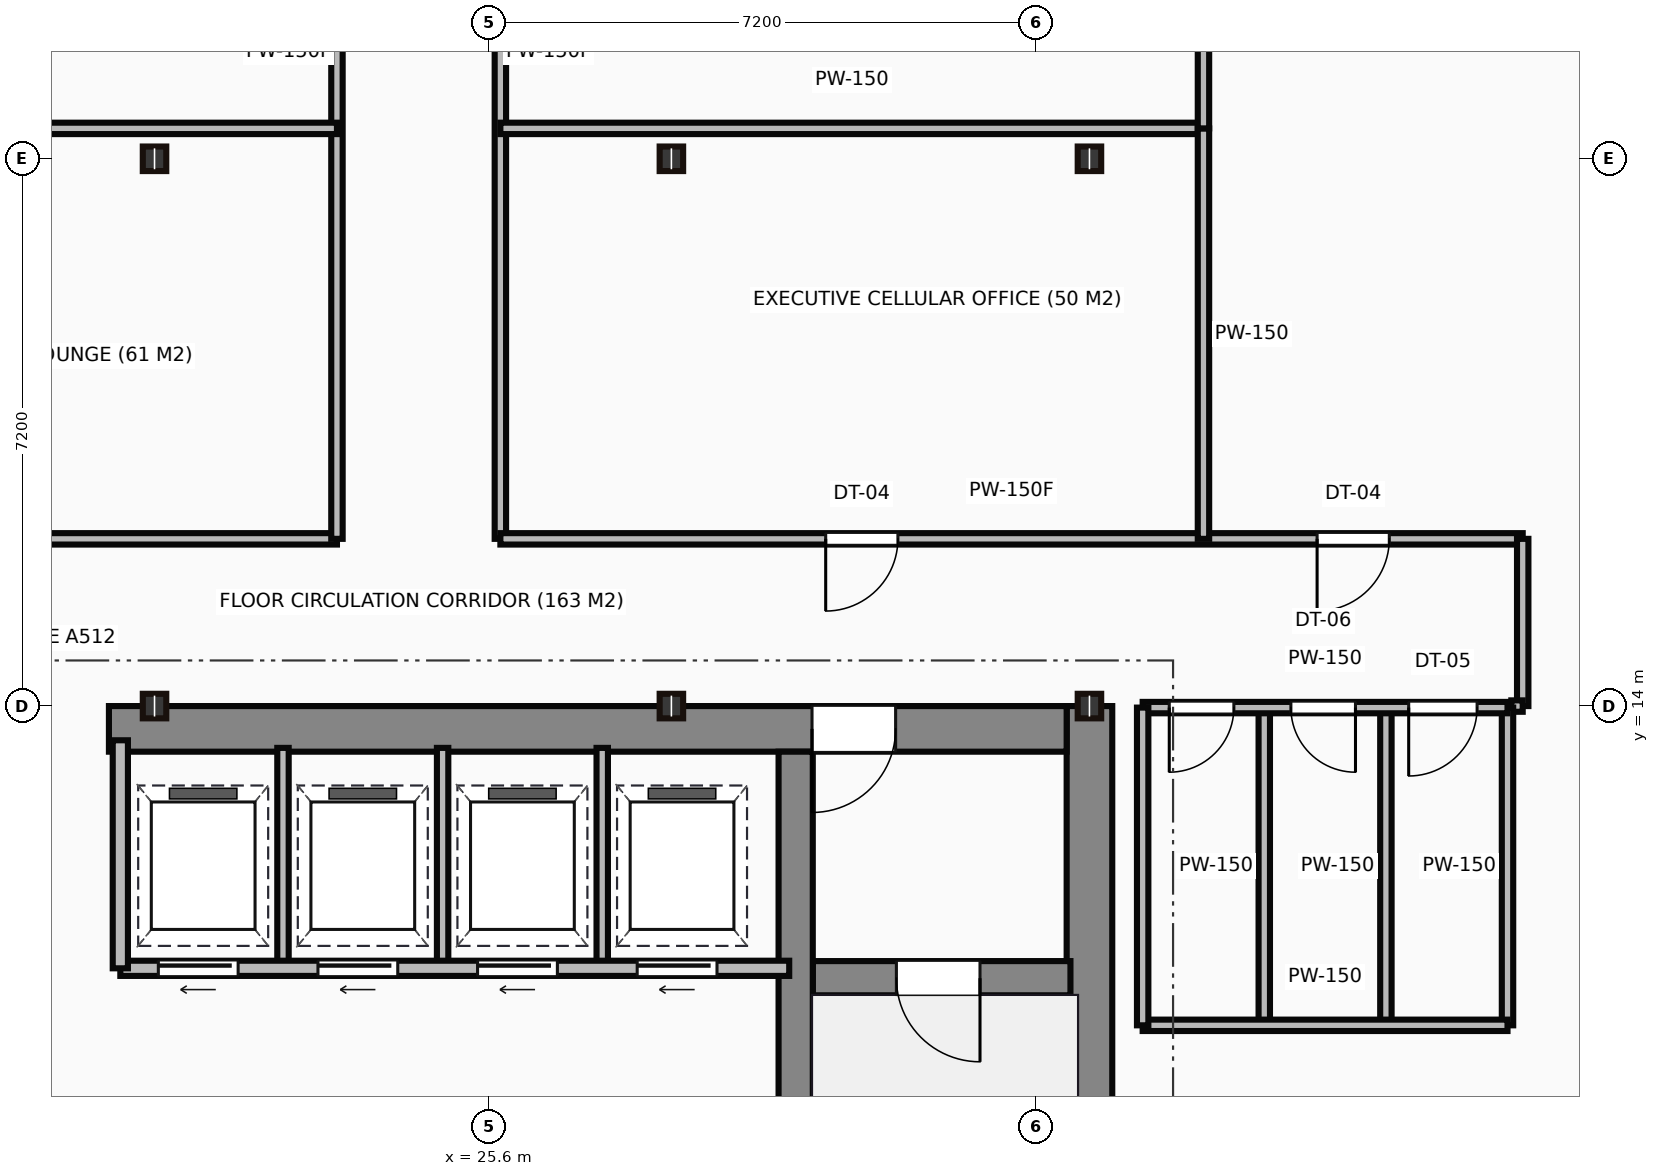
"""IFC4 building model, lengths in metres.
Left out: names, types, materials, properties, quantities, classifications, styles, units other than length and angle.
Written with IfcOpenShell. Run it as: python <this file> out.ifc"""

import sys

from ifc_helpers import new_model, si_unit, direction, frame, frame_2d, origin, origin_2d, place, context, subcontext, project, spatial, rectangle, i_section, extrude, source, transform, mapped, element, fill, save


model = new_model("IFC4")
c1 = context("Model", 3, precision=1e-05, world=origin(), true_north=direction((0.0, 1.0)))
c2 = subcontext(c1, "Body", "Model", "MODEL_VIEW")
j1 = project(units=[si_unit("LENGTHUNIT", "METRE"), si_unit("PLANEANGLEUNIT", "RADIAN")], contexts=[c1])
p1 = place(None, origin())
s1 = spatial("IfcSite", under=j1, at=p1, CompositionType="ELEMENT")
p2 = place(p1, origin())
s2 = spatial("IfcBuilding", under=s1, at=p2, CompositionType="ELEMENT")
p3 = place(p2, frame((0.0, 0.0, 277.05)))
s3 = spatial("IfcBuildingStorey", under=s2, at=p3, CompositionType="ELEMENT", Elevation=277.05)
m1 = source(origin(), c2, "Body", "SweptSolid", [
    extrude(rectangle(XDim=13.1, YDim=0.6, at=frame_2d((6.55, 0.0))), origin(), (0.0, 0.0, 1.0), 3.65),
])
p4 = place(p3, frame((33.5, 0.9, 0.0), z_axis=(0.0, 0.0, 1.0), x_axis=(0.0, 1.0, 0.0)))
e1 = element("IfcWall", 1, at=p4, inside=s3, PredefinedType="SHEAR", context=c2, shape_type="MappedRepresentation", body=[
    mapped(m1, transform((0.0, 0.0, 0.0))),
])
m2 = source(origin(), c2, "Body", "SweptSolid", [
    extrude(rectangle(XDim=12.6, YDim=0.6, at=frame_2d((6.3, 0.0))), origin(), (0.0, 0.0, 1.0), 3.65),
])
p5 = place(p3, frame((20.6, 13.7, 0.0), z_axis=(0.0, 0.0, 1.0), x_axis=(1.0, 0.0, 0.0)))
e2 = element("IfcWall", 2, at=p5, inside=s3, PredefinedType="SHEAR", context=c2, shape_type="MappedRepresentation", body=[
    mapped(m2, transform((0.0, 0.0, 0.0))),
])
p6 = place(p5, frame((9.25, 0.0, 0.0)))
e3 = element("IfcOpeningElement", 3, at=p6, cuts=e2, PredefinedType="OPENING", context=c2, shape_type="SweptSolid", body=[
    extrude(rectangle(XDim=1.1, YDim=2.15, at=frame_2d((0.55, 1.075))), frame((0.0, 0.31, 0.0), z_axis=(0.0, -1.0, 0.0), x_axis=(1.0, 0.0, 0.0)), (0.0, 0.0, 1.0), 0.62),
])
m3 = source(origin(), c2, "Body", "SweptSolid", [
    extrude(rectangle(XDim=12.5, YDim=0.45, at=frame_2d((6.25, 0.0))), origin(), (0.0, 0.0, 1.0), 3.65),
])
p7 = place(p3, frame((29.635, 0.9, 0.0), z_axis=(0.0, 0.0, 1.0), x_axis=(0.0, 1.0, 0.0)))
e4 = element("IfcWall", 4, at=p7, inside=s3, PredefinedType="SHEAR", context=c2, shape_type="MappedRepresentation", body=[
    mapped(m3, transform((0.0, 0.0, 0.0))),
])
m4 = source(origin(), c2, "Body", "SweptSolid", [
    extrude(rectangle(XDim=3.39, YDim=0.45, at=frame_2d((1.695, 0.0))), origin(), (0.0, 0.0, 1.0), 3.65),
])
p8 = place(p3, frame((29.86, 10.42, 0.0), z_axis=(0.0, 0.0, 1.0), x_axis=(1.0, 0.0, 0.0)))
e5 = element("IfcWall", 5, at=p8, inside=s3, PredefinedType="SHEAR", context=c2, shape_type="MappedRepresentation", body=[
    mapped(m4, transform((0.0, 0.0, 0.0))),
])
p9 = place(p8, frame((1.1, 0.0, 0.0)))
e6 = element("IfcOpeningElement", 6, at=p9, cuts=e5, PredefinedType="OPENING", context=c2, shape_type="SweptSolid", body=[
    extrude(rectangle(XDim=1.1, YDim=2.15, at=frame_2d((0.55, 1.075))), frame((0.0, 0.235, 0.0), z_axis=(0.0, -1.0, 0.0), x_axis=(1.0, 0.0, 0.0)), (0.0, 0.0, 1.0), 0.47),
])
m5 = source(origin(), c2, "Body", "SweptSolid", [
    extrude(i_section(OverallWidth=0.309, OverallDepth=0.323, WebThickness=0.014, FlangeThickness=0.023, at=origin_2d()), origin(), (0.0, 0.0, 1.0), 3.65),
])
for number, where, z_axis, x_axis in (
    (7, (21.2, 14.0, 0.0), (0.0, 0.0, 1.0), (1.0, 0.0, 0.0)),
    (8, (21.2, 21.2, 0.0), (0.0, 0.0, 1.0), (1.0, 0.0, 0.0)),
    (9, (28.0, 14.0, 0.0), (0.0, 0.0, 1.0), (1.0, 0.0, 0.0)),
    (10, (28.0, 21.2, 0.0), (0.0, 0.0, 1.0), (1.0, 0.0, 0.0)),
    (11, (33.5, 14.0, 0.0), (0.0, 0.0, 1.0), (1.0, 0.0, 0.0)),
    (12, (33.5, 21.2, 0.0), (0.0, 0.0, 1.0), (1.0, 0.0, 0.0)),
):
    element("IfcColumn", number, at=place(p3, frame(where, z_axis=z_axis, x_axis=x_axis)), inside=s3, PredefinedType="COLUMN", context=c2, shape_type="MappedRepresentation", body=[
        mapped(m5, transform((0.0, 0.0, 0.0))),
    ])
m6 = source(origin(), c2, "Body", "SweptSolid", [
    extrude(rectangle(XDim=8.8, YDim=0.2, at=frame_2d((4.4, 0.0))), origin(), (0.0, 0.0, 1.0), 3.4),
])
p10 = place(p3, frame((20.75, 10.55, 0.0), z_axis=(0.0, 0.0, 1.0), x_axis=(1.0, 0.0, 0.0)))
e13 = element("IfcWall", 13, at=p10, inside=s3, PredefinedType="PARTITIONING", context=c2, shape_type="MappedRepresentation", body=[
    mapped(m6, transform((0.0, 0.0, 0.0))),
])
p11 = place(p10, frame((0.5, 0.0, 0.0)))
e14 = element("IfcOpeningElement", 14, at=p11, cuts=e13, PredefinedType="OPENING", context=c2, shape_type="SweptSolid", body=[
    extrude(rectangle(XDim=1.05, YDim=2.15, at=frame_2d((0.525, 1.075))), frame((0.0, 0.11, 0.0), z_axis=(0.0, -1.0, 0.0), x_axis=(1.0, 0.0, 0.0)), (0.0, 0.0, 1.0), 0.22),
])
p12 = place(p10, frame((2.6, 0.0, 0.0)))
e15 = element("IfcOpeningElement", 15, at=p12, cuts=e13, PredefinedType="OPENING", context=c2, shape_type="SweptSolid", body=[
    extrude(rectangle(XDim=1.05, YDim=2.15, at=frame_2d((0.525, 1.075))), frame((0.0, 0.11, 0.0), z_axis=(0.0, -1.0, 0.0), x_axis=(1.0, 0.0, 0.0)), (0.0, 0.0, 1.0), 0.22),
])
p13 = place(p10, frame((4.7, 0.0, 0.0)))
e16 = element("IfcOpeningElement", 16, at=p13, cuts=e13, PredefinedType="OPENING", context=c2, shape_type="SweptSolid", body=[
    extrude(rectangle(XDim=1.05, YDim=2.15, at=frame_2d((0.525, 1.075))), frame((0.0, 0.11, 0.0), z_axis=(0.0, -1.0, 0.0), x_axis=(1.0, 0.0, 0.0)), (0.0, 0.0, 1.0), 0.22),
])
p14 = place(p10, frame((6.8, 0.0, 0.0)))
e17 = element("IfcOpeningElement", 17, at=p14, cuts=e13, PredefinedType="OPENING", context=c2, shape_type="SweptSolid", body=[
    extrude(rectangle(XDim=1.05, YDim=2.15, at=frame_2d((0.525, 1.075))), frame((0.0, 0.11, 0.0), z_axis=(0.0, -1.0, 0.0), x_axis=(1.0, 0.0, 0.0)), (0.0, 0.0, 1.0), 0.22),
])
m7 = source(origin(), c2, "Body", "SweptSolid", [
    extrude(rectangle(XDim=3.0, YDim=0.2, at=frame_2d((1.5, 0.0))), origin(), (0.0, 0.0, 1.0), 3.4),
])
p15 = place(p3, frame((20.75, 10.55, 0.0), z_axis=(0.0, 0.0, 1.0), x_axis=(0.0, 1.0, 0.0)))
e18 = element("IfcWall", 18, at=p15, inside=s3, PredefinedType="PARTITIONING", context=c2, shape_type="MappedRepresentation", body=[
    mapped(m7, transform((0.0, 0.0, 0.0))),
])
m8 = source(origin(), c2, "Body", "SweptSolid", [
    extrude(rectangle(XDim=2.85, YDim=0.15, at=frame_2d((1.425, 0.0))), origin(), (0.0, 0.0, 1.0), 3.4),
])
for number, where, z_axis, x_axis in (
    (19, (22.89, 10.6, 0.0), (0.0, 0.0, 1.0), (0.0, 1.0, 0.0)),
    (20, (24.99, 10.6, 0.0), (0.0, 0.0, 1.0), (0.0, 1.0, 0.0)),
    (21, (27.09, 10.6, 0.0), (0.0, 0.0, 1.0), (0.0, 1.0, 0.0)),
):
    element("IfcWall", number, at=place(p3, frame(where, z_axis=z_axis, x_axis=x_axis)), inside=s3, PredefinedType="PARTITIONING", context=c2, shape_type="MappedRepresentation", body=[
        mapped(m8, transform((0.0, 0.0, 0.0))),
    ])
m9 = source(origin(), c2, "Body", "SweptSolid", [
    extrude(rectangle(XDim=4.8, YDim=0.15, at=frame_2d((2.4, 0.0))), origin(), (0.0, 0.0, 1.0), 2.787),
])
p16 = place(p3, frame((34.2, 13.98, 0.0), z_axis=(0.0, 0.0, 1.0), x_axis=(1.0, 0.0, 0.0)))
e22 = element("IfcWall", 22, at=p16, inside=s3, PredefinedType="PARTITIONING", context=c2, shape_type="MappedRepresentation", body=[
    mapped(m9, transform((0.0, 0.0, 0.0))),
])
p17 = place(p16, frame((0.35, 0.0, 0.0)))
e23 = element("IfcOpeningElement", 23, at=p17, cuts=e22, PredefinedType="OPENING", context=c2, shape_type="SweptSolid", body=[
    extrude(rectangle(XDim=0.85, YDim=2.1, at=frame_2d((0.425, 1.05))), frame((0.0, 0.085, 0.0), z_axis=(0.0, -1.0, 0.0), x_axis=(1.0, 0.0, 0.0)), (0.0, 0.0, 1.0), 0.17),
])
p18 = place(p16, frame((1.95, 0.0, 0.0)))
e24 = element("IfcOpeningElement", 24, at=p18, cuts=e22, PredefinedType="OPENING", context=c2, shape_type="SweptSolid", body=[
    extrude(rectangle(XDim=0.85, YDim=2.1, at=frame_2d((0.425, 1.05))), frame((0.0, 0.085, 0.0), z_axis=(0.0, -1.0, 0.0), x_axis=(1.0, 0.0, 0.0)), (0.0, 0.0, 1.0), 0.17),
])
p19 = place(p16, frame((3.5, 0.0, 0.0)))
e25 = element("IfcOpeningElement", 25, at=p19, cuts=e22, PredefinedType="OPENING", context=c2, shape_type="SweptSolid", body=[
    extrude(rectangle(XDim=0.9, YDim=2.1, at=frame_2d((0.45, 1.05))), frame((0.0, 0.085, 0.0), z_axis=(0.0, -1.0, 0.0), x_axis=(1.0, 0.0, 0.0)), (0.0, 0.0, 1.0), 0.17),
])
m10 = source(origin(), c2, "Body", "SweptSolid", [
    extrude(rectangle(XDim=4.8, YDim=0.15, at=frame_2d((2.4, 0.0))), origin(), (0.0, 0.0, 1.0), 3.4),
])
p20 = place(p3, frame((34.2, 9.8, 0.0), z_axis=(0.0, 0.0, 1.0), x_axis=(1.0, 0.0, 0.0)))
e26 = element("IfcWall", 26, at=p20, inside=s3, PredefinedType="PARTITIONING", context=c2, shape_type="MappedRepresentation", body=[
    mapped(m10, transform((0.0, 0.0, 0.0))),
])
m11 = source(origin(), c2, "Body", "SweptSolid", [
    extrude(rectangle(XDim=4.18, YDim=0.15, at=frame_2d((2.09, 0.0))), origin(), (0.0, 0.0, 1.0), 3.4),
])
for number, where, z_axis, x_axis in (
    (27, (39.0, 9.8, 0.0), (0.0, 0.0, 1.0), (0.0, 1.0, 0.0)),
    (28, (34.2, 9.8, 0.0), (0.0, 0.0, 1.0), (0.0, 1.0, 0.0)),
    (29, (35.8, 9.8, 0.0), (0.0, 0.0, 1.0), (0.0, 1.0, 0.0)),
    (30, (37.4, 9.8, 0.0), (0.0, 0.0, 1.0), (0.0, 1.0, 0.0)),
):
    element("IfcWall", number, at=place(p3, frame(where, z_axis=z_axis, x_axis=x_axis)), inside=s3, PredefinedType="PARTITIONING", context=c2, shape_type="MappedRepresentation", body=[
        mapped(m11, transform((0.0, 0.0, 0.0))),
    ])
m12 = source(origin(), c2, "Body", "SweptSolid", [
    extrude(rectangle(XDim=12.8, YDim=0.15, at=frame_2d((6.4, 0.0))), origin(), (0.0, 0.0, 1.0), 3.4),
])
p21 = place(p3, frame((25.75, 29.0, 0.0), z_axis=(0.0, 0.0, 1.0), x_axis=(0.0, -1.0, 0.0)))
e31 = element("IfcWall", 31, at=p21, inside=s3, PredefinedType="PARTITIONING", context=c2, shape_type="MappedRepresentation", body=[
    mapped(m12, transform((0.0, 0.0, 0.0))),
])
p22 = place(p21, frame((3.355, 0.0, 0.0)))
e32 = element("IfcOpeningElement", 32, at=p22, cuts=e31, PredefinedType="OPENING", context=c2, shape_type="SweptSolid", body=[
    extrude(rectangle(XDim=0.95, YDim=2.15, at=frame_2d((0.475, 1.075))), frame((0.0, 0.085, 0.0), z_axis=(0.0, -1.0, 0.0), x_axis=(1.0, 0.0, 0.0)), (0.0, 0.0, 1.0), 0.17),
])
m13 = source(origin(), c2, "Body", "SweptSolid", [
    extrude(rectangle(XDim=13.45, YDim=0.15, at=frame_2d((6.725, 0.0))), origin(), (0.0, 0.0, 1.0), 3.4),
])
p23 = place(p3, frame((25.75, 16.2, 0.0), z_axis=(0.0, 0.0, 1.0), x_axis=(1.0, 0.0, 0.0)))
e33 = element("IfcWall", 33, at=p23, inside=s3, PredefinedType="PARTITIONING", context=c2, shape_type="MappedRepresentation", body=[
    mapped(m13, transform((0.0, 0.0, 0.0))),
])
p24 = place(p23, frame((4.28, 0.0, 0.0)))
e34 = element("IfcOpeningElement", 34, at=p24, cuts=e33, PredefinedType="OPENING", context=c2, shape_type="SweptSolid", body=[
    extrude(rectangle(XDim=0.95, YDim=2.15, at=frame_2d((0.475, 1.075))), frame((0.0, 0.085, 0.0), z_axis=(0.0, -1.0, 0.0), x_axis=(1.0, 0.0, 0.0)), (0.0, 0.0, 1.0), 0.17),
])
p25 = place(p23, frame((10.745, 0.0, 0.0)))
e35 = element("IfcOpeningElement", 35, at=p25, cuts=e33, PredefinedType="OPENING", context=c2, shape_type="SweptSolid", body=[
    extrude(rectangle(XDim=0.95, YDim=2.15, at=frame_2d((0.475, 1.075))), frame((0.0, 0.085, 0.0), z_axis=(0.0, -1.0, 0.0), x_axis=(1.0, 0.0, 0.0)), (0.0, 0.0, 1.0), 0.17),
])
m14 = source(origin(), c2, "Body", "SweptSolid", [
    extrude(rectangle(XDim=2.2, YDim=0.15, at=frame_2d((1.1, 0.0))), origin(), (0.0, 0.0, 1.0), 3.4),
])
p26 = place(p3, frame((39.2, 16.2, 0.0), z_axis=(0.0, 0.0, 1.0), x_axis=(0.0, -1.0, 0.0)))
e36 = element("IfcWall", 36, at=p26, inside=s3, PredefinedType="PARTITIONING", context=c2, shape_type="MappedRepresentation", body=[
    mapped(m14, transform((0.0, 0.0, 0.0))),
])
m15 = source(origin(), c2, "Body", "SweptSolid", [
    extrude(rectangle(XDim=0.15, YDim=0.15, at=frame_2d((0.075, 0.0))), origin(), (0.0, 0.0, 1.0), 3.4),
])
p27 = place(p3, frame((39.2, 14.0, 0.0), z_axis=(0.0, 0.0, 1.0), x_axis=(-1.0, 0.0, 0.0)))
e37 = element("IfcWall", 37, at=p27, inside=s3, PredefinedType="PARTITIONING", context=c2, shape_type="MappedRepresentation", body=[
    mapped(m15, transform((0.0, 0.0, 0.0))),
])
m16 = source(origin(), c2, "Body", "SweptSolid", [
    extrude(rectangle(XDim=11.65, YDim=0.15, at=frame_2d((5.825, 0.0))), origin(), (0.0, 0.0, 1.0), 3.4),
])
p28 = place(p3, frame((11.95, 16.2, 0.0), z_axis=(0.0, 0.0, 1.0), x_axis=(1.0, 0.0, 0.0)))
e38 = element("IfcWall", 38, at=p28, inside=s3, PredefinedType="PARTITIONING", context=c2, shape_type="MappedRepresentation", body=[
    mapped(m16, transform((0.0, 0.0, 0.0))),
])
p29 = place(p28, frame((5.35, 0.0, 0.0)))
e39 = element("IfcOpeningElement", 39, at=p29, cuts=e38, PredefinedType="OPENING", context=c2, shape_type="SweptSolid", body=[
    extrude(rectangle(XDim=0.95, YDim=2.15, at=frame_2d((0.475, 1.075))), frame((0.0, 0.085, 0.0), z_axis=(0.0, -1.0, 0.0), x_axis=(1.0, 0.0, 0.0)), (0.0, 0.0, 1.0), 0.17),
])
p30 = place(p3, frame((23.6, 16.2, 0.0), z_axis=(0.0, 0.0, 1.0), x_axis=(0.0, 1.0, 0.0)))
e40 = element("IfcWall", 40, at=p30, inside=s3, PredefinedType="PARTITIONING", context=c2, shape_type="MappedRepresentation", body=[
    mapped(m12, transform((0.0, 0.0, 0.0))),
])
m17 = source(origin(), c2, "Body", "SweptSolid", [
    extrude(rectangle(XDim=11.4, YDim=0.15, at=frame_2d((5.7, 0.0))), origin(), (0.0, 0.0, 1.0), 3.4),
])
p31 = place(p3, frame((23.6, 21.6, 0.0), z_axis=(0.0, 0.0, 1.0), x_axis=(-1.0, 0.0, 0.0)))
e41 = element("IfcWall", 41, at=p31, inside=s3, PredefinedType="PARTITIONING", context=c2, shape_type="MappedRepresentation", body=[
    mapped(m17, transform((0.0, 0.0, 0.0))),
])
m18 = source(origin(), c2, "Body", "SweptSolid", [
    extrude(rectangle(XDim=9.25, YDim=0.15, at=frame_2d((4.625, 0.0))), origin(), (0.0, 0.0, 1.0), 3.4),
])
p32 = place(p3, frame((25.75, 21.6, 0.0), z_axis=(0.0, 0.0, 1.0), x_axis=(1.0, 0.0, 0.0)))
e42 = element("IfcWall", 42, at=p32, inside=s3, PredefinedType="PARTITIONING", context=c2, shape_type="MappedRepresentation", body=[
    mapped(m18, transform((0.0, 0.0, 0.0))),
])
m19 = source(origin(), c2, "Body", "SweptSolid", [
    extrude(rectangle(XDim=5.4, YDim=0.15, at=frame_2d((2.7, 0.0))), origin(), (0.0, 0.0, 1.0), 3.4),
])
p33 = place(p3, frame((35.0, 21.6, 0.0), z_axis=(0.0, 0.0, 1.0), x_axis=(0.0, -1.0, 0.0)))
e43 = element("IfcWall", 43, at=p33, inside=s3, PredefinedType="PARTITIONING", context=c2, shape_type="MappedRepresentation", body=[
    mapped(m19, transform((0.0, 0.0, 0.0))),
])
m20 = source(origin(), c2, "Body", "SweptSolid", [
    extrude(rectangle(XDim=7.6, YDim=0.15, at=frame_2d((3.8, 0.0))), origin(), (0.0, 0.0, 1.0), 3.4),
])
p34 = place(p3, frame((35.0, 29.2, 0.0), z_axis=(0.0, 0.0, 1.0), x_axis=(0.0, -1.0, 0.0)))
e44 = element("IfcWall", 44, at=p34, inside=s3, PredefinedType="PARTITIONING", context=c2, shape_type="MappedRepresentation", body=[
    mapped(m20, transform((0.0, 0.0, 0.0))),
])
m21 = source(origin(), c2, "Body", "SweptSolid", [
    extrude(rectangle(XDim=1.1, YDim=2.15, at=frame_2d((0.55, 1.075))), frame((0.0, 0.025, 0.0), z_axis=(0.0, -1.0, 0.0), x_axis=(1.0, 0.0, 0.0)), (0.0, 0.0, 1.0), 0.05),
])
p35 = place(p9, frame((1.1, 0.0, 0.0), z_axis=(0.0, 0.0, 1.0), x_axis=(-1.0, 0.0, 0.0)))
e45 = element("IfcDoor", 45, at=p35, inside=s3, OperationType="SINGLE_SWING_RIGHT", PredefinedType="DOOR", context=c2, shape_type="MappedRepresentation", body=[
    mapped(m21, transform((0.0, 0.0, 0.0))),
])
fill(e6, e45)
p36 = place(p6, origin())
e46 = element("IfcDoor", 46, at=p36, inside=s3, OperationType="SINGLE_SWING_LEFT", PredefinedType="DOOR", context=c2, shape_type="MappedRepresentation", body=[
    mapped(m21, transform((0.0, 0.0, 0.0))),
])
fill(e3, e46)
m22 = source(origin(), c2, "Body", "SweptSolid", [
    extrude(rectangle(XDim=1.05, YDim=2.15, at=frame_2d((0.525, 1.075))), frame((0.0, 0.025, 0.0), z_axis=(0.0, -1.0, 0.0), x_axis=(1.0, 0.0, 0.0)), (0.0, 0.0, 1.0), 0.05),
])
p37 = place(p11, frame((1.05, 0.0, 0.0), z_axis=(0.0, 0.0, 1.0), x_axis=(-1.0, 0.0, 0.0)))
e47 = element("IfcDoor", 47, at=p37, inside=s3, OperationType="SLIDING_TO_LEFT", PredefinedType="DOOR", context=c2, shape_type="MappedRepresentation", body=[
    mapped(m22, transform((0.0, 0.0, 0.0))),
])
fill(e14, e47)
p38 = place(p12, frame((1.05, 0.0, 0.0), z_axis=(0.0, 0.0, 1.0), x_axis=(-1.0, 0.0, 0.0)))
e48 = element("IfcDoor", 48, at=p38, inside=s3, OperationType="SLIDING_TO_LEFT", PredefinedType="DOOR", context=c2, shape_type="MappedRepresentation", body=[
    mapped(m22, transform((0.0, 0.0, 0.0))),
])
fill(e15, e48)
p39 = place(p13, frame((1.05, 0.0, 0.0), z_axis=(0.0, 0.0, 1.0), x_axis=(-1.0, 0.0, 0.0)))
e49 = element("IfcDoor", 49, at=p39, inside=s3, OperationType="SLIDING_TO_LEFT", PredefinedType="DOOR", context=c2, shape_type="MappedRepresentation", body=[
    mapped(m22, transform((0.0, 0.0, 0.0))),
])
fill(e16, e49)
p40 = place(p14, frame((1.05, 0.0, 0.0), z_axis=(0.0, 0.0, 1.0), x_axis=(-1.0, 0.0, 0.0)))
e50 = element("IfcDoor", 50, at=p40, inside=s3, OperationType="SLIDING_TO_LEFT", PredefinedType="DOOR", context=c2, shape_type="MappedRepresentation", body=[
    mapped(m22, transform((0.0, 0.0, 0.0))),
])
fill(e17, e50)
m23 = source(origin(), c2, "Body", "SweptSolid", [
    extrude(rectangle(XDim=0.85, YDim=2.1, at=frame_2d((0.425, 1.05))), frame((0.0, 0.025, 0.0), z_axis=(0.0, -1.0, 0.0), x_axis=(1.0, 0.0, 0.0)), (0.0, 0.0, 1.0), 0.05),
])
p41 = place(p17, frame((0.85, 0.0, 0.0), z_axis=(0.0, 0.0, 1.0), x_axis=(-1.0, 0.0, 0.0)))
e51 = element("IfcDoor", 51, at=p41, inside=s3, OperationType="SINGLE_SWING_LEFT", PredefinedType="DOOR", context=c2, shape_type="MappedRepresentation", body=[
    mapped(m23, transform((0.0, 0.0, 0.0))),
])
fill(e23, e51)
p42 = place(p18, frame((0.85, 0.0, 0.0), z_axis=(0.0, 0.0, 1.0), x_axis=(-1.0, 0.0, 0.0)))
e52 = element("IfcDoor", 52, at=p42, inside=s3, OperationType="SINGLE_SWING_RIGHT", PredefinedType="DOOR", context=c2, shape_type="MappedRepresentation", body=[
    mapped(m23, transform((0.0, 0.0, 0.0))),
])
fill(e24, e52)
m24 = source(origin(), c2, "Body", "SweptSolid", [
    extrude(rectangle(XDim=0.9, YDim=2.1, at=frame_2d((0.45, 1.05))), frame((0.0, 0.025, 0.0), z_axis=(0.0, -1.0, 0.0), x_axis=(1.0, 0.0, 0.0)), (0.0, 0.0, 1.0), 0.05),
])
p43 = place(p19, frame((0.9, 0.0, 0.0), z_axis=(0.0, 0.0, 1.0), x_axis=(-1.0, 0.0, 0.0)))
e53 = element("IfcDoor", 53, at=p43, inside=s3, OperationType="SINGLE_SWING_LEFT", PredefinedType="DOOR", context=c2, shape_type="MappedRepresentation", body=[
    mapped(m24, transform((0.0, 0.0, 0.0))),
])
fill(e25, e53)
m25 = source(origin(), c2, "Body", "SweptSolid", [
    extrude(rectangle(XDim=0.95, YDim=2.15, at=frame_2d((0.475, 1.075))), frame((0.0, 0.025, 0.0), z_axis=(0.0, -1.0, 0.0), x_axis=(1.0, 0.0, 0.0)), (0.0, 0.0, 1.0), 0.05),
])
p44 = place(p24, origin())
e54 = element("IfcDoor", 54, at=p44, inside=s3, OperationType="SINGLE_SWING_LEFT", PredefinedType="DOOR", context=c2, shape_type="MappedRepresentation", body=[
    mapped(m25, transform((0.0, 0.0, 0.0))),
])
fill(e34, e54)
p45 = place(p25, origin())
e55 = element("IfcDoor", 55, at=p45, inside=s3, OperationType="SINGLE_SWING_LEFT", PredefinedType="DOOR", context=c2, shape_type="MappedRepresentation", body=[
    mapped(m25, transform((0.0, 0.0, 0.0))),
])
fill(e35, e55)
save(model, sys.argv[1])
